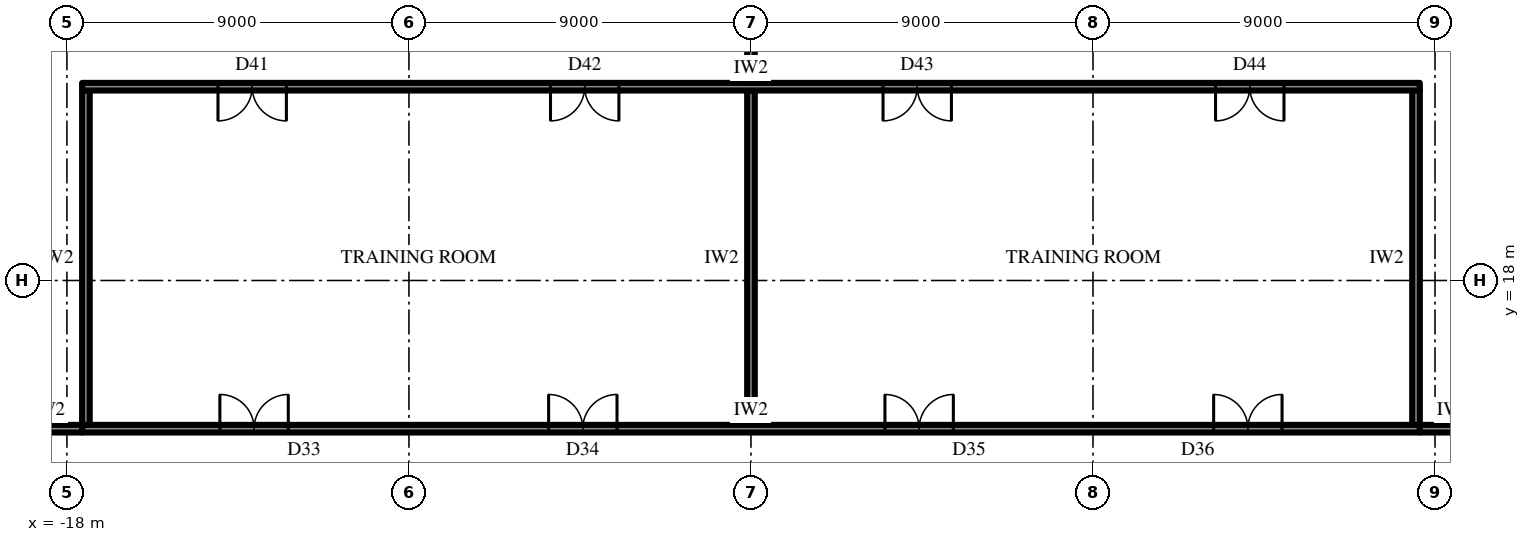
"""IFC4 building model, lengths in metres.
Left out: names, types, materials, properties, quantities, classifications, styles, units other than length and angle.
Written with IfcOpenShell. Run it as: python <this file> out.ifc"""

import sys

from ifc_helpers import new_model, si_unit, direction, frame, frame_2d, origin, place, context, subcontext, project, spatial, rectangle, extrude, element, fill, save


model = new_model("IFC4")
c1 = context("Model", 3, precision=1e-05, world=origin(), true_north=direction((0.0, 1.0)))
c2 = subcontext(c1, "Body", "Model", "MODEL_VIEW")
j1 = project(units=[si_unit("LENGTHUNIT", "METRE"), si_unit("PLANEANGLEUNIT", "RADIAN")], contexts=[c1])
p1 = place(None, origin())
s1 = spatial("IfcSite", under=j1, at=p1, CompositionType="ELEMENT")
p2 = place(p1, origin())
s2 = spatial("IfcBuilding", under=s1, at=p2, CompositionType="ELEMENT")
p3 = place(p2, frame((0.0, 0.0, 18.5)))
s3 = spatial("IfcBuildingStorey", under=s2, at=p3, CompositionType="ELEMENT", Elevation=18.5)
p4 = place(p3, frame((-17.6, 14.1, 0.0), z_axis=(0.0, 0.0, 1.0), x_axis=(1.0, 0.0, 0.0)))
e1 = element("IfcWall", 1, at=p4, inside=s3, PredefinedType="PARTITIONING", context=c2, shape_type="SweptSolid", body=[
    extrude(rectangle(XDim=35.2, YDim=0.2, at=frame_2d((17.6, 0.0))), origin(), (0.0, 0.0, 1.0), 4.65),
])
p5 = place(p4, frame((3.625, 0.0, 0.0)))
e2 = element("IfcOpeningElement", 2, at=p5, cuts=e1, PredefinedType="OPENING", context=c2, shape_type="SweptSolid", body=[
    extrude(rectangle(XDim=1.8, YDim=2.4, at=frame_2d((0.9, 1.2))), frame((0.0, 0.11, 0.0), z_axis=(0.0, -1.0, 0.0), x_axis=(1.0, 0.0, 0.0)), (0.0, 0.0, 1.0), 0.22),
])
p6 = place(p4, frame((12.275, 0.0, 0.0)))
e3 = element("IfcOpeningElement", 3, at=p6, cuts=e1, PredefinedType="OPENING", context=c2, shape_type="SweptSolid", body=[
    extrude(rectangle(XDim=1.8, YDim=2.4, at=frame_2d((0.9, 1.2))), frame((0.0, 0.11, 0.0), z_axis=(0.0, -1.0, 0.0), x_axis=(1.0, 0.0, 0.0)), (0.0, 0.0, 1.0), 0.22),
])
p7 = place(p4, frame((21.125, 0.0, 0.0)))
e4 = element("IfcOpeningElement", 4, at=p7, cuts=e1, PredefinedType="OPENING", context=c2, shape_type="SweptSolid", body=[
    extrude(rectangle(XDim=1.8, YDim=2.4, at=frame_2d((0.9, 1.2))), frame((0.0, 0.11, 0.0), z_axis=(0.0, -1.0, 0.0), x_axis=(1.0, 0.0, 0.0)), (0.0, 0.0, 1.0), 0.22),
])
p8 = place(p4, frame((29.775, 0.0, 0.0)))
e5 = element("IfcOpeningElement", 5, at=p8, cuts=e1, PredefinedType="OPENING", context=c2, shape_type="SweptSolid", body=[
    extrude(rectangle(XDim=1.8, YDim=2.4, at=frame_2d((0.9, 1.2))), frame((0.0, 0.11, 0.0), z_axis=(0.0, -1.0, 0.0), x_axis=(1.0, 0.0, 0.0)), (0.0, 0.0, 1.0), 0.22),
])
p9 = place(p3, frame((-17.5, 14.2, 0.0), z_axis=(0.0, 0.0, 1.0), x_axis=(0.0, 1.0, 0.0)))
e6 = element("IfcWall", 6, at=p9, inside=s3, PredefinedType="PARTITIONING", context=c2, shape_type="SweptSolid", body=[
    extrude(rectangle(XDim=8.8, YDim=0.2, at=frame_2d((4.4, 0.0))), origin(), (0.0, 0.0, 1.0), 4.65),
])
p10 = place(p3, frame((0.0, 14.2, 0.0), z_axis=(0.0, 0.0, 1.0), x_axis=(0.0, 1.0, 0.0)))
e7 = element("IfcWall", 7, at=p10, inside=s3, PredefinedType="PARTITIONING", context=c2, shape_type="SweptSolid", body=[
    extrude(rectangle(XDim=8.8, YDim=0.2, at=frame_2d((4.4, 0.0))), origin(), (0.0, 0.0, 1.0), 3.594),
])
p11 = place(p3, frame((17.5, 14.2, 0.0), z_axis=(0.0, 0.0, 1.0), x_axis=(0.0, 1.0, 0.0)))
e8 = element("IfcWall", 8, at=p11, inside=s3, PredefinedType="PARTITIONING", context=c2, shape_type="SweptSolid", body=[
    extrude(rectangle(XDim=8.8, YDim=0.2, at=frame_2d((4.4, 0.0))), origin(), (0.0, 0.0, 1.0), 4.65),
])
p12 = place(p3, frame((-17.6, 23.1, 0.0), z_axis=(0.0, 0.0, 1.0), x_axis=(1.0, 0.0, 0.0)))
e9 = element("IfcWall", 9, at=p12, inside=s3, PredefinedType="PARTITIONING", context=c2, shape_type="SweptSolid", body=[
    extrude(rectangle(XDim=35.2, YDim=0.2, at=frame_2d((17.6, 0.0))), origin(), (0.0, 0.0, 1.0), 4.65),
])
p13 = place(p12, frame((3.575, 0.0, 0.0)))
e10 = element("IfcOpeningElement", 10, at=p13, cuts=e9, PredefinedType="OPENING", context=c2, shape_type="SweptSolid", body=[
    extrude(rectangle(XDim=1.8, YDim=2.4, at=frame_2d((0.9, 1.2))), frame((0.0, 0.11, 0.0), z_axis=(0.0, -1.0, 0.0), x_axis=(1.0, 0.0, 0.0)), (0.0, 0.0, 1.0), 0.22),
])
p14 = place(p12, frame((12.325, 0.0, 0.0)))
e11 = element("IfcOpeningElement", 11, at=p14, cuts=e9, PredefinedType="OPENING", context=c2, shape_type="SweptSolid", body=[
    extrude(rectangle(XDim=1.8, YDim=2.4, at=frame_2d((0.9, 1.2))), frame((0.0, 0.11, 0.0), z_axis=(0.0, -1.0, 0.0), x_axis=(1.0, 0.0, 0.0)), (0.0, 0.0, 1.0), 0.22),
])
p15 = place(p12, frame((21.075, 0.0, 0.0)))
e12 = element("IfcOpeningElement", 12, at=p15, cuts=e9, PredefinedType="OPENING", context=c2, shape_type="SweptSolid", body=[
    extrude(rectangle(XDim=1.8, YDim=2.4, at=frame_2d((0.9, 1.2))), frame((0.0, 0.11, 0.0), z_axis=(0.0, -1.0, 0.0), x_axis=(1.0, 0.0, 0.0)), (0.0, 0.0, 1.0), 0.22),
])
p16 = place(p12, frame((29.825, 0.0, 0.0)))
e13 = element("IfcOpeningElement", 13, at=p16, cuts=e9, PredefinedType="OPENING", context=c2, shape_type="SweptSolid", body=[
    extrude(rectangle(XDim=1.8, YDim=2.4, at=frame_2d((0.9, 1.2))), frame((0.0, 0.11, 0.0), z_axis=(0.0, -1.0, 0.0), x_axis=(1.0, 0.0, 0.0)), (0.0, 0.0, 1.0), 0.22),
])
for number, where, z_axis, x_axis in (
    (14, (-19.4, 14.1, 0.0), (0.0, 0.0, 1.0), (1.0, 0.0, 0.0)),
    (15, (17.6, 14.1, 0.0), (0.0, 0.0, 1.0), (1.0, 0.0, 0.0)),
):
    element("IfcWall", number, at=place(p3, frame(where, z_axis=z_axis, x_axis=x_axis)), inside=s3, PredefinedType="PARTITIONING", context=c2, shape_type="SweptSolid", body=[
        extrude(rectangle(XDim=1.8, YDim=0.2, at=frame_2d((0.9, 0.0))), origin(), (0.0, 0.0, 1.0), 4.65),
    ])
p17 = place(p3, frame((0.0, 23.2, 0.0), z_axis=(0.0, 0.0, 1.0), x_axis=(0.0, 1.0, 0.0)))
e16 = element("IfcWall", 16, at=p17, inside=s3, PredefinedType="PARTITIONING", context=c2, shape_type="SweptSolid", body=[
    extrude(rectangle(XDim=10.52, YDim=0.2, at=frame_2d((5.26, 0.0))), origin(), (0.0, 0.0, 1.0), 3.594),
])
p18 = place(p13, frame((1.8, 0.0, 0.0), z_axis=(0.0, 0.0, 1.0), x_axis=(-1.0, 0.0, 0.0)))
e17 = element("IfcDoor", 17, at=p18, inside=s3, OperationType="DOUBLE_DOOR_SINGLE_SWING", PredefinedType="DOOR", context=c2, shape_type="SweptSolid", body=[
    extrude(rectangle(XDim=1.8, YDim=2.4, at=frame_2d((0.9, 1.2))), frame((0.0, 0.025, 0.0), z_axis=(0.0, -1.0, 0.0), x_axis=(1.0, 0.0, 0.0)), (0.0, 0.0, 1.0), 0.05),
])
fill(e10, e17)
p19 = place(p14, frame((1.8, 0.0, 0.0), z_axis=(0.0, 0.0, 1.0), x_axis=(-1.0, 0.0, 0.0)))
e18 = element("IfcDoor", 18, at=p19, inside=s3, OperationType="DOUBLE_DOOR_SINGLE_SWING", PredefinedType="DOOR", context=c2, shape_type="SweptSolid", body=[
    extrude(rectangle(XDim=1.8, YDim=2.4, at=frame_2d((0.9, 1.2))), frame((0.0, 0.025, 0.0), z_axis=(0.0, -1.0, 0.0), x_axis=(1.0, 0.0, 0.0)), (0.0, 0.0, 1.0), 0.05),
])
fill(e11, e18)
p20 = place(p15, frame((1.8, 0.0, 0.0), z_axis=(0.0, 0.0, 1.0), x_axis=(-1.0, 0.0, 0.0)))
e19 = element("IfcDoor", 19, at=p20, inside=s3, OperationType="DOUBLE_DOOR_SINGLE_SWING", PredefinedType="DOOR", context=c2, shape_type="SweptSolid", body=[
    extrude(rectangle(XDim=1.8, YDim=2.4, at=frame_2d((0.9, 1.2))), frame((0.0, 0.025, 0.0), z_axis=(0.0, -1.0, 0.0), x_axis=(1.0, 0.0, 0.0)), (0.0, 0.0, 1.0), 0.05),
])
fill(e12, e19)
p21 = place(p16, frame((1.8, 0.0, 0.0), z_axis=(0.0, 0.0, 1.0), x_axis=(-1.0, 0.0, 0.0)))
e20 = element("IfcDoor", 20, at=p21, inside=s3, OperationType="DOUBLE_DOOR_SINGLE_SWING", PredefinedType="DOOR", context=c2, shape_type="SweptSolid", body=[
    extrude(rectangle(XDim=1.8, YDim=2.4, at=frame_2d((0.9, 1.2))), frame((0.0, 0.025, 0.0), z_axis=(0.0, -1.0, 0.0), x_axis=(1.0, 0.0, 0.0)), (0.0, 0.0, 1.0), 0.05),
])
fill(e13, e20)
p22 = place(p5, origin())
e21 = element("IfcDoor", 21, at=p22, inside=s3, OperationType="DOUBLE_DOOR_SINGLE_SWING", PredefinedType="DOOR", context=c2, shape_type="SweptSolid", body=[
    extrude(rectangle(XDim=1.8, YDim=2.4, at=frame_2d((0.9, 1.2))), frame((0.0, 0.025, 0.0), z_axis=(0.0, -1.0, 0.0), x_axis=(1.0, 0.0, 0.0)), (0.0, 0.0, 1.0), 0.05),
])
fill(e2, e21)
p23 = place(p6, origin())
e22 = element("IfcDoor", 22, at=p23, inside=s3, OperationType="DOUBLE_DOOR_SINGLE_SWING", PredefinedType="DOOR", context=c2, shape_type="SweptSolid", body=[
    extrude(rectangle(XDim=1.8, YDim=2.4, at=frame_2d((0.9, 1.2))), frame((0.0, 0.025, 0.0), z_axis=(0.0, -1.0, 0.0), x_axis=(1.0, 0.0, 0.0)), (0.0, 0.0, 1.0), 0.05),
])
fill(e3, e22)
p24 = place(p7, origin())
e23 = element("IfcDoor", 23, at=p24, inside=s3, OperationType="DOUBLE_DOOR_SINGLE_SWING", PredefinedType="DOOR", context=c2, shape_type="SweptSolid", body=[
    extrude(rectangle(XDim=1.8, YDim=2.4, at=frame_2d((0.9, 1.2))), frame((0.0, 0.025, 0.0), z_axis=(0.0, -1.0, 0.0), x_axis=(1.0, 0.0, 0.0)), (0.0, 0.0, 1.0), 0.05),
])
fill(e4, e23)
p25 = place(p8, origin())
e24 = element("IfcDoor", 24, at=p25, inside=s3, OperationType="DOUBLE_DOOR_SINGLE_SWING", PredefinedType="DOOR", context=c2, shape_type="SweptSolid", body=[
    extrude(rectangle(XDim=1.8, YDim=2.4, at=frame_2d((0.9, 1.2))), frame((0.0, 0.025, 0.0), z_axis=(0.0, -1.0, 0.0), x_axis=(1.0, 0.0, 0.0)), (0.0, 0.0, 1.0), 0.05),
])
fill(e5, e24)
save(model, sys.argv[1])
